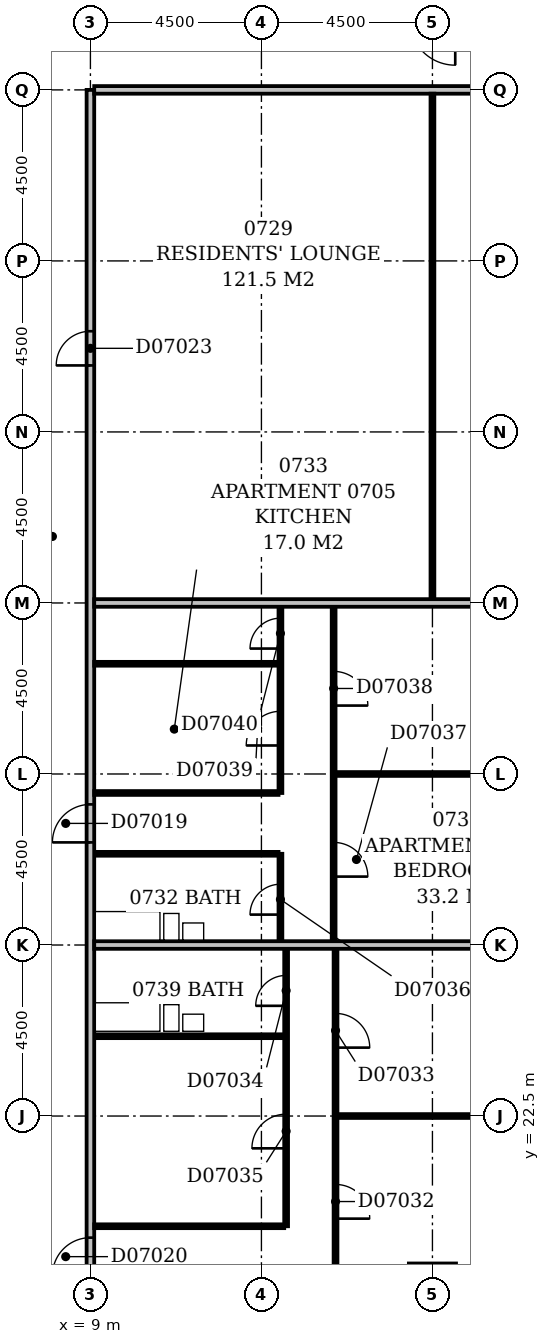
"""IFC4 building model, lengths in metres.
Left out: names, types, materials, properties, quantities, classifications, styles, units other than length and angle.
Written with IfcOpenShell. Run it as: python <this file> out.ifc"""

import sys

from ifc_helpers import new_model, si_unit, direction, frame, frame_2d, origin, place, context, subcontext, project, spatial, rectangle, extrude, element, fill, save


model = new_model("IFC4")
c1 = context("Model", 3, precision=1e-05, world=origin(), true_north=direction((0.0, 1.0)))
c2 = subcontext(c1, "Body", "Model", "MODEL_VIEW")
j1 = project(units=[si_unit("LENGTHUNIT", "METRE"), si_unit("PLANEANGLEUNIT", "RADIAN")], contexts=[c1])
p1 = place(None, origin())
s1 = spatial("IfcSite", under=j1, at=p1, CompositionType="ELEMENT")
p2 = place(p1, origin())
s2 = spatial("IfcBuilding", under=s1, at=p2, CompositionType="ELEMENT")
p3 = place(p2, frame((0.0, 0.0, 36.2)))
s3 = spatial("IfcBuildingStorey", under=s2, at=p3, CompositionType="ELEMENT", Elevation=36.2)
p4 = place(p3, frame((9.0, 5.0, 0.0), z_axis=(0.0, 0.0, 1.0), x_axis=(0.0, 1.0, 0.0)))
e1 = element("IfcWall", 1, at=p4, inside=s3, PredefinedType="PARTITIONING", context=c2, shape_type="SweptSolid", body=[
    extrude(rectangle(XDim=44.5, YDim=0.2, at=frame_2d((22.25, 0.0))), origin(), (0.0, 0.0, 1.0), 3.3),
])
p5 = place(p4, frame((24.7, 0.0, 0.0)))
e2 = element("IfcOpeningElement", 2, at=p5, cuts=e1, PredefinedType="OPENING", context=c2, shape_type="SweptSolid", body=[
    extrude(rectangle(XDim=1.0, YDim=2.1, at=frame_2d((0.5, 1.05))), frame((0.0, 0.112, 0.0), z_axis=(0.0, -1.0, 0.0), x_axis=(1.0, 0.0, 0.0)), (0.0, 0.0, 1.0), 0.224),
])
p6 = place(p4, frame((13.3, 0.0, 0.0)))
e3 = element("IfcOpeningElement", 3, at=p6, cuts=e1, PredefinedType="OPENING", context=c2, shape_type="SweptSolid", body=[
    extrude(rectangle(XDim=1.0, YDim=2.1, at=frame_2d((0.5, 1.05))), frame((0.0, 0.112, 0.0), z_axis=(0.0, -1.0, 0.0), x_axis=(1.0, 0.0, 0.0)), (0.0, 0.0, 1.0), 0.224),
])
p7 = place(p4, frame((10.45, 0.0, 0.0)))
e4 = element("IfcOpeningElement", 4, at=p7, cuts=e1, PredefinedType="OPENING", context=c2, shape_type="SweptSolid", body=[
    extrude(rectangle(XDim=1.0, YDim=2.1, at=frame_2d((0.5, 1.05))), frame((0.0, 0.112, 0.0), z_axis=(0.0, -1.0, 0.0), x_axis=(1.0, 0.0, 0.0)), (0.0, 0.0, 1.0), 0.224),
])
p8 = place(p4, frame((5.95, 0.0, 0.0)))
e5 = element("IfcOpeningElement", 5, at=p8, cuts=e1, PredefinedType="OPENING", context=c2, shape_type="SweptSolid", body=[
    extrude(rectangle(XDim=1.0, YDim=2.1, at=frame_2d((0.5, 1.05))), frame((0.0, 0.112, 0.0), z_axis=(0.0, -1.0, 0.0), x_axis=(1.0, 0.0, 0.0)), (0.0, 0.0, 1.0), 0.224),
])
p9 = place(p4, frame((37.25, 0.0, 0.0)))
e6 = element("IfcOpeningElement", 6, at=p9, cuts=e1, PredefinedType="OPENING", context=c2, shape_type="SweptSolid", body=[
    extrude(rectangle(XDim=0.9, YDim=2.1, at=frame_2d((0.45, 1.05))), frame((0.0, 0.112, 0.0), z_axis=(0.0, -1.0, 0.0), x_axis=(1.0, 0.0, 0.0)), (0.0, 0.0, 1.0), 0.224),
])
p10 = place(p4, frame((1.5, 0.0, 0.0)))
e7 = element("IfcOpeningElement", 7, at=p10, cuts=e1, PredefinedType="OPENING", context=c2, shape_type="SweptSolid", body=[
    extrude(rectangle(XDim=0.9, YDim=2.1, at=frame_2d((0.45, 1.05))), frame((0.0, 0.112, 0.0), z_axis=(0.0, -1.0, 0.0), x_axis=(1.0, 0.0, 0.0)), (0.0, 0.0, 1.0), 0.224),
])
p11 = place(p3, frame((15.45, 18.1, 0.0), z_axis=(0.0, 0.0, 1.0), x_axis=(0.0, 1.0, 0.0)))
e8 = element("IfcWall", 8, at=p11, inside=s3, PredefinedType="PARTITIONING", context=c2, shape_type="SweptSolid", body=[
    extrude(rectangle(XDim=8.8, YDim=0.1, at=frame_2d((4.4, 0.0))), origin(), (0.0, 0.0, 1.0), 3.3),
])
p12 = place(p11, frame((1.7, 0.0, 0.0)))
e9 = element("IfcOpeningElement", 9, at=p12, cuts=e8, PredefinedType="OPENING", context=c2, shape_type="SweptSolid", body=[
    extrude(rectangle(XDim=0.9, YDim=2.1, at=frame_2d((0.45, 1.05))), frame((0.0, 0.062, 0.0), z_axis=(0.0, -1.0, 0.0), x_axis=(1.0, 0.0, 0.0)), (0.0, 0.0, 1.0), 0.124),
])
p13 = place(p11, frame((6.2, 0.0, 0.0)))
e10 = element("IfcOpeningElement", 10, at=p13, cuts=e8, PredefinedType="OPENING", context=c2, shape_type="SweptSolid", body=[
    extrude(rectangle(XDim=0.9, YDim=2.1, at=frame_2d((0.45, 1.05))), frame((0.0, 0.062, 0.0), z_axis=(0.0, -1.0, 0.0), x_axis=(1.0, 0.0, 0.0)), (0.0, 0.0, 1.0), 0.124),
])
p14 = place(p3, frame((9.1, 19.6, 0.0), z_axis=(0.0, 0.0, 1.0), x_axis=(1.0, 0.0, 0.0)))
e11 = element("IfcWall", 11, at=p14, inside=s3, PredefinedType="PARTITIONING", context=c2, shape_type="SweptSolid", body=[
    extrude(rectangle(XDim=5.0, YDim=0.1, at=frame_2d((2.5, 0.0))), origin(), (0.0, 0.0, 1.0), 3.3),
])
p15 = place(p3, frame((14.15, 19.6, 0.0), z_axis=(0.0, 0.0, 1.0), x_axis=(0.0, 1.0, 0.0)))
e12 = element("IfcWall", 12, at=p15, inside=s3, PredefinedType="PARTITIONING", context=c2, shape_type="SweptSolid", body=[
    extrude(rectangle(XDim=7.3, YDim=0.1, at=frame_2d((3.65, 0.0))), origin(), (0.0, 0.0, 1.0), 3.3),
])
p16 = place(p15, frame((5.8, 0.0, 0.0)))
e13 = element("IfcOpeningElement", 13, at=p16, cuts=e12, PredefinedType="OPENING", context=c2, shape_type="SweptSolid", body=[
    extrude(rectangle(XDim=0.8, YDim=2.1, at=frame_2d((0.4, 1.05))), frame((0.0, 0.062, 0.0), z_axis=(0.0, -1.0, 0.0), x_axis=(1.0, 0.0, 0.0)), (0.0, 0.0, 1.0), 0.124),
])
p17 = place(p15, frame((2.05, 0.0, 0.0)))
e14 = element("IfcOpeningElement", 14, at=p17, cuts=e12, PredefinedType="OPENING", context=c2, shape_type="SweptSolid", body=[
    extrude(rectangle(XDim=0.9, YDim=2.1, at=frame_2d((0.45, 1.05))), frame((0.0, 0.062, 0.0), z_axis=(0.0, -1.0, 0.0), x_axis=(1.0, 0.0, 0.0)), (0.0, 0.0, 1.0), 0.124),
])
p18 = place(p3, frame((15.5, 22.5, 0.0), z_axis=(0.0, 0.0, 1.0), x_axis=(1.0, 0.0, 0.0)))
e15 = element("IfcWall", 15, at=p18, inside=s3, PredefinedType="PARTITIONING", context=c2, shape_type="SweptSolid", body=[
    extrude(rectangle(XDim=6.4, YDim=0.1, at=frame_2d((3.2, 0.0))), origin(), (0.0, 0.0, 1.0), 3.3),
])
p19 = place(p3, frame((9.1, 24.6, 0.0), z_axis=(0.0, 0.0, 1.0), x_axis=(1.0, 0.0, 0.0)))
e16 = element("IfcWall", 16, at=p19, inside=s3, PredefinedType="PLUMBINGWALL", context=c2, shape_type="SweptSolid", body=[
    extrude(rectangle(XDim=5.0, YDim=0.1, at=frame_2d((2.5, 0.0))), origin(), (0.0, 0.0, 1.0), 3.3),
])
p20 = place(p3, frame((9.1, 27.0, 0.0), z_axis=(0.0, 0.0, 1.0), x_axis=(1.0, 0.0, 0.0)))
e17 = element("IfcWall", 17, at=p20, inside=s3, PredefinedType="PARTITIONING", context=c2, shape_type="SweptSolid", body=[
    extrude(rectangle(XDim=12.8, YDim=0.2, at=frame_2d((6.4, 0.0))), origin(), (0.0, 0.0, 1.0), 2.7),
])
p21 = place(p3, frame((14.0, 27.1, 0.0), z_axis=(0.0, 0.0, 1.0), x_axis=(0.0, 1.0, 0.0)))
e18 = element("IfcWall", 18, at=p21, inside=s3, PredefinedType="PARTITIONING", context=c2, shape_type="SweptSolid", body=[
    extrude(rectangle(XDim=2.3, YDim=0.1, at=frame_2d((1.15, 0.0))), origin(), (0.0, 0.0, 1.0), 3.3),
])
p22 = place(p21, frame((0.7, 0.0, 0.0)))
e19 = element("IfcOpeningElement", 19, at=p22, cuts=e18, PredefinedType="OPENING", context=c2, shape_type="SweptSolid", body=[
    extrude(rectangle(XDim=0.8, YDim=2.1, at=frame_2d((0.4, 1.05))), frame((0.0, 0.062, 0.0), z_axis=(0.0, -1.0, 0.0), x_axis=(1.0, 0.0, 0.0)), (0.0, 0.0, 1.0), 0.124),
])
p23 = place(p3, frame((15.4, 27.1, 0.0), z_axis=(0.0, 0.0, 1.0), x_axis=(0.0, 1.0, 0.0)))
e20 = element("IfcWall", 20, at=p23, inside=s3, PredefinedType="PARTITIONING", context=c2, shape_type="SweptSolid", body=[
    extrude(rectangle(XDim=8.8, YDim=0.1, at=frame_2d((4.4, 0.0))), origin(), (0.0, 0.0, 1.0), 3.3),
])
p24 = place(p23, frame((1.7, 0.0, 0.0)))
e21 = element("IfcOpeningElement", 21, at=p24, cuts=e20, PredefinedType="OPENING", context=c2, shape_type="SweptSolid", body=[
    extrude(rectangle(XDim=0.9, YDim=2.1, at=frame_2d((0.45, 1.05))), frame((0.0, 0.062, 0.0), z_axis=(0.0, -1.0, 0.0), x_axis=(1.0, 0.0, 0.0)), (0.0, 0.0, 1.0), 0.124),
])
p25 = place(p23, frame((6.2, 0.0, 0.0)))
e22 = element("IfcOpeningElement", 22, at=p25, cuts=e20, PredefinedType="OPENING", context=c2, shape_type="SweptSolid", body=[
    extrude(rectangle(XDim=0.9, YDim=2.1, at=frame_2d((0.45, 1.05))), frame((0.0, 0.062, 0.0), z_axis=(0.0, -1.0, 0.0), x_axis=(1.0, 0.0, 0.0)), (0.0, 0.0, 1.0), 0.124),
])
p26 = place(p3, frame((9.1, 29.4, 0.0), z_axis=(0.0, 0.0, 1.0), x_axis=(1.0, 0.0, 0.0)))
e23 = element("IfcWall", 23, at=p26, inside=s3, PredefinedType="PLUMBINGWALL", context=c2, shape_type="SweptSolid", body=[
    extrude(rectangle(XDim=4.85, YDim=0.1, at=frame_2d((2.425, 0.0))), origin(), (0.0, 0.0, 1.0), 3.3),
])
p27 = place(p3, frame((9.1, 31.0, 0.0), z_axis=(0.0, 0.0, 1.0), x_axis=(1.0, 0.0, 0.0)))
e24 = element("IfcWall", 24, at=p27, inside=s3, PredefinedType="PARTITIONING", context=c2, shape_type="SweptSolid", body=[
    extrude(rectangle(XDim=4.85, YDim=0.1, at=frame_2d((2.425, 0.0))), origin(), (0.0, 0.0, 1.0), 3.3),
])
p28 = place(p3, frame((14.0, 31.0, 0.0), z_axis=(0.0, 0.0, 1.0), x_axis=(0.0, 1.0, 0.0)))
e25 = element("IfcWall", 25, at=p28, inside=s3, PredefinedType="PARTITIONING", context=c2, shape_type="SweptSolid", body=[
    extrude(rectangle(XDim=4.9, YDim=0.1, at=frame_2d((2.45, 0.0))), origin(), (0.0, 0.0, 1.0), 3.3),
])
p29 = place(p28, frame((1.25, 0.0, 0.0)))
e26 = element("IfcOpeningElement", 26, at=p29, cuts=e25, PredefinedType="OPENING", context=c2, shape_type="SweptSolid", body=[
    extrude(rectangle(XDim=0.9, YDim=2.1, at=frame_2d((0.45, 1.05))), frame((0.0, 0.062, 0.0), z_axis=(0.0, -1.0, 0.0), x_axis=(1.0, 0.0, 0.0)), (0.0, 0.0, 1.0), 0.124),
])
p30 = place(p28, frame((3.8, 0.0, 0.0)))
e27 = element("IfcOpeningElement", 27, at=p30, cuts=e25, PredefinedType="OPENING", context=c2, shape_type="SweptSolid", body=[
    extrude(rectangle(XDim=0.8, YDim=2.1, at=frame_2d((0.4, 1.05))), frame((0.0, 0.062, 0.0), z_axis=(0.0, -1.0, 0.0), x_axis=(1.0, 0.0, 0.0)), (0.0, 0.0, 1.0), 0.124),
])
p31 = place(p3, frame((15.45, 31.5, 0.0), z_axis=(0.0, 0.0, 1.0), x_axis=(1.0, 0.0, 0.0)))
e28 = element("IfcWall", 28, at=p31, inside=s3, PredefinedType="PARTITIONING", context=c2, shape_type="SweptSolid", body=[
    extrude(rectangle(XDim=6.45, YDim=0.1, at=frame_2d((3.225, 0.0))), origin(), (0.0, 0.0, 1.0), 3.3),
])
p32 = place(p3, frame((9.1, 34.4, 0.0), z_axis=(0.0, 0.0, 1.0), x_axis=(1.0, 0.0, 0.0)))
e29 = element("IfcWall", 29, at=p32, inside=s3, PredefinedType="PARTITIONING", context=c2, shape_type="SweptSolid", body=[
    extrude(rectangle(XDim=4.85, YDim=0.1, at=frame_2d((2.425, 0.0))), origin(), (0.0, 0.0, 1.0), 3.3),
])
p33 = place(p3, frame((9.1, 36.0, 0.0), z_axis=(0.0, 0.0, 1.0), x_axis=(1.0, 0.0, 0.0)))
e30 = element("IfcWall", 30, at=p33, inside=s3, PredefinedType="PARTITIONING", context=c2, shape_type="SweptSolid", body=[
    extrude(rectangle(XDim=12.8, YDim=0.2, at=frame_2d((6.4, 0.0))), origin(), (0.0, 0.0, 1.0), 2.4),
])
p34 = place(p3, frame((18.0, 36.1, 0.0), z_axis=(0.0, 0.0, 1.0), x_axis=(0.0, 1.0, 0.0)))
e31 = element("IfcWall", 31, at=p34, inside=s3, PredefinedType="PARTITIONING", context=c2, shape_type="SweptSolid", body=[
    extrude(rectangle(XDim=13.3, YDim=0.1, at=frame_2d((6.65, 0.0))), origin(), (0.0, 0.0, 1.0), 3.3),
])
p35 = place(p3, frame((9.1, 49.5, 0.0), z_axis=(0.0, 0.0, 1.0), x_axis=(1.0, 0.0, 0.0)))
e32 = element("IfcWall", 32, at=p35, inside=s3, PredefinedType="PARTITIONING", context=c2, shape_type="SweptSolid", body=[
    extrude(rectangle(XDim=57.8, YDim=0.2, at=frame_2d((28.9, 0.0))), origin(), (0.0, 0.0, 1.0), 3.3),
])
p36 = place(p35, frame((20.6, 0.0, 0.0)))
e33 = element("IfcOpeningElement", 33, at=p36, cuts=e32, PredefinedType="OPENING", context=c2, shape_type="SweptSolid", body=[
    extrude(rectangle(XDim=1.0, YDim=2.1, at=frame_2d((0.5, 1.05))), frame((0.0, 0.112, 0.0), z_axis=(0.0, -1.0, 0.0), x_axis=(1.0, 0.0, 0.0)), (0.0, 0.0, 1.0), 0.224),
])
p37 = place(p35, frame((31.7, 0.0, 0.0)))
e34 = element("IfcOpeningElement", 34, at=p37, cuts=e32, PredefinedType="OPENING", context=c2, shape_type="SweptSolid", body=[
    extrude(rectangle(XDim=1.0, YDim=2.1, at=frame_2d((0.5, 1.05))), frame((0.0, 0.112, 0.0), z_axis=(0.0, -1.0, 0.0), x_axis=(1.0, 0.0, 0.0)), (0.0, 0.0, 1.0), 0.224),
])
p38 = place(p35, frame((47.6, 0.0, 0.0)))
e35 = element("IfcOpeningElement", 35, at=p38, cuts=e32, PredefinedType="OPENING", context=c2, shape_type="SweptSolid", body=[
    extrude(rectangle(XDim=1.0, YDim=2.1, at=frame_2d((0.5, 1.05))), frame((0.0, 0.112, 0.0), z_axis=(0.0, -1.0, 0.0), x_axis=(1.0, 0.0, 0.0)), (0.0, 0.0, 1.0), 0.224),
])
p39 = place(p35, frame((54.15, 0.0, 0.0)))
e36 = element("IfcOpeningElement", 36, at=p39, cuts=e32, PredefinedType="OPENING", context=c2, shape_type="SweptSolid", body=[
    extrude(rectangle(XDim=1.0, YDim=2.1, at=frame_2d((0.5, 1.05))), frame((0.0, 0.112, 0.0), z_axis=(0.0, -1.0, 0.0), x_axis=(1.0, 0.0, 0.0)), (0.0, 0.0, 1.0), 0.224),
])
p40 = place(p35, frame((10.65, 0.0, 0.0)))
e37 = element("IfcOpeningElement", 37, at=p40, cuts=e32, PredefinedType="OPENING", context=c2, shape_type="SweptSolid", body=[
    extrude(rectangle(XDim=0.9, YDim=2.1, at=frame_2d((0.45, 1.05))), frame((0.0, 0.112, 0.0), z_axis=(0.0, -1.0, 0.0), x_axis=(1.0, 0.0, 0.0)), (0.0, 0.0, 1.0), 0.224),
])
p41 = place(p5, origin())
e38 = element("IfcDoor", 38, at=p41, inside=s3, OperationType="SINGLE_SWING_LEFT", PredefinedType="DOOR", context=c2, shape_type="SweptSolid", body=[
    extrude(rectangle(XDim=1.0, YDim=2.1, at=frame_2d((0.5, 1.05))), frame((0.0, 0.025, 0.0), z_axis=(0.0, -1.0, 0.0), x_axis=(1.0, 0.0, 0.0)), (0.0, 0.0, 1.0), 0.05),
])
fill(e2, e38)
p42 = place(p6, origin())
e39 = element("IfcDoor", 39, at=p42, inside=s3, OperationType="SINGLE_SWING_LEFT", PredefinedType="DOOR", context=c2, shape_type="SweptSolid", body=[
    extrude(rectangle(XDim=1.0, YDim=2.1, at=frame_2d((0.5, 1.05))), frame((0.0, 0.025, 0.0), z_axis=(0.0, -1.0, 0.0), x_axis=(1.0, 0.0, 0.0)), (0.0, 0.0, 1.0), 0.05),
])
fill(e3, e39)
p43 = place(p9, origin())
e40 = element("IfcDoor", 40, at=p43, inside=s3, OperationType="SINGLE_SWING_LEFT", PredefinedType="DOOR", context=c2, shape_type="SweptSolid", body=[
    extrude(rectangle(XDim=0.9, YDim=2.1, at=frame_2d((0.45, 1.05))), frame((0.0, 0.025, 0.0), z_axis=(0.0, -1.0, 0.0), x_axis=(1.0, 0.0, 0.0)), (0.0, 0.0, 1.0), 0.05),
])
fill(e6, e40)
p44 = place(p12, frame((0.9, 0.0, 0.0), z_axis=(0.0, 0.0, 1.0), x_axis=(-1.0, 0.0, 0.0)))
e41 = element("IfcDoor", 41, at=p44, inside=s3, OperationType="SINGLE_SWING_RIGHT", PredefinedType="DOOR", context=c2, shape_type="SweptSolid", body=[
    extrude(rectangle(XDim=0.9, YDim=2.1, at=frame_2d((0.45, 1.05))), frame((0.0, 0.025, 0.0), z_axis=(0.0, -1.0, 0.0), x_axis=(1.0, 0.0, 0.0)), (0.0, 0.0, 1.0), 0.05),
])
fill(e9, e41)
p45 = place(p13, frame((0.9, 0.0, 0.0), z_axis=(0.0, 0.0, 1.0), x_axis=(-1.0, 0.0, 0.0)))
e42 = element("IfcDoor", 42, at=p45, inside=s3, OperationType="SINGLE_SWING_RIGHT", PredefinedType="DOOR", context=c2, shape_type="SweptSolid", body=[
    extrude(rectangle(XDim=0.9, YDim=2.1, at=frame_2d((0.45, 1.05))), frame((0.0, 0.025, 0.0), z_axis=(0.0, -1.0, 0.0), x_axis=(1.0, 0.0, 0.0)), (0.0, 0.0, 1.0), 0.05),
])
fill(e10, e42)
p46 = place(p16, origin())
e43 = element("IfcDoor", 43, at=p46, inside=s3, OperationType="SINGLE_SWING_LEFT", PredefinedType="DOOR", context=c2, shape_type="SweptSolid", body=[
    extrude(rectangle(XDim=0.8, YDim=2.1, at=frame_2d((0.4, 1.05))), frame((0.0, 0.025, 0.0), z_axis=(0.0, -1.0, 0.0), x_axis=(1.0, 0.0, 0.0)), (0.0, 0.0, 1.0), 0.05),
])
fill(e13, e43)
p47 = place(p17, origin())
e44 = element("IfcDoor", 44, at=p47, inside=s3, OperationType="SINGLE_SWING_LEFT", PredefinedType="DOOR", context=c2, shape_type="SweptSolid", body=[
    extrude(rectangle(XDim=0.9, YDim=2.1, at=frame_2d((0.45, 1.05))), frame((0.0, 0.025, 0.0), z_axis=(0.0, -1.0, 0.0), x_axis=(1.0, 0.0, 0.0)), (0.0, 0.0, 1.0), 0.05),
])
fill(e14, e44)
p48 = place(p22, origin())
e45 = element("IfcDoor", 45, at=p48, inside=s3, OperationType="SINGLE_SWING_LEFT", PredefinedType="DOOR", context=c2, shape_type="SweptSolid", body=[
    extrude(rectangle(XDim=0.8, YDim=2.1, at=frame_2d((0.4, 1.05))), frame((0.0, 0.025, 0.0), z_axis=(0.0, -1.0, 0.0), x_axis=(1.0, 0.0, 0.0)), (0.0, 0.0, 1.0), 0.05),
])
fill(e19, e45)
p49 = place(p24, frame((0.9, 0.0, 0.0), z_axis=(0.0, 0.0, 1.0), x_axis=(-1.0, 0.0, 0.0)))
e46 = element("IfcDoor", 46, at=p49, inside=s3, OperationType="SINGLE_SWING_RIGHT", PredefinedType="DOOR", context=c2, shape_type="SweptSolid", body=[
    extrude(rectangle(XDim=0.9, YDim=2.1, at=frame_2d((0.45, 1.05))), frame((0.0, 0.025, 0.0), z_axis=(0.0, -1.0, 0.0), x_axis=(1.0, 0.0, 0.0)), (0.0, 0.0, 1.0), 0.05),
])
fill(e21, e46)
p50 = place(p25, frame((0.9, 0.0, 0.0), z_axis=(0.0, 0.0, 1.0), x_axis=(-1.0, 0.0, 0.0)))
e47 = element("IfcDoor", 47, at=p50, inside=s3, OperationType="SINGLE_SWING_RIGHT", PredefinedType="DOOR", context=c2, shape_type="SweptSolid", body=[
    extrude(rectangle(XDim=0.9, YDim=2.1, at=frame_2d((0.45, 1.05))), frame((0.0, 0.025, 0.0), z_axis=(0.0, -1.0, 0.0), x_axis=(1.0, 0.0, 0.0)), (0.0, 0.0, 1.0), 0.05),
])
fill(e22, e47)
p51 = place(p29, origin())
e48 = element("IfcDoor", 48, at=p51, inside=s3, OperationType="SINGLE_SWING_LEFT", PredefinedType="DOOR", context=c2, shape_type="SweptSolid", body=[
    extrude(rectangle(XDim=0.9, YDim=2.1, at=frame_2d((0.45, 1.05))), frame((0.0, 0.025, 0.0), z_axis=(0.0, -1.0, 0.0), x_axis=(1.0, 0.0, 0.0)), (0.0, 0.0, 1.0), 0.05),
])
fill(e26, e48)
p52 = place(p30, origin())
e49 = element("IfcDoor", 49, at=p52, inside=s3, OperationType="SINGLE_SWING_LEFT", PredefinedType="DOOR", context=c2, shape_type="SweptSolid", body=[
    extrude(rectangle(XDim=0.8, YDim=2.1, at=frame_2d((0.4, 1.05))), frame((0.0, 0.025, 0.0), z_axis=(0.0, -1.0, 0.0), x_axis=(1.0, 0.0, 0.0)), (0.0, 0.0, 1.0), 0.05),
])
fill(e27, e49)
save(model, sys.argv[1])
